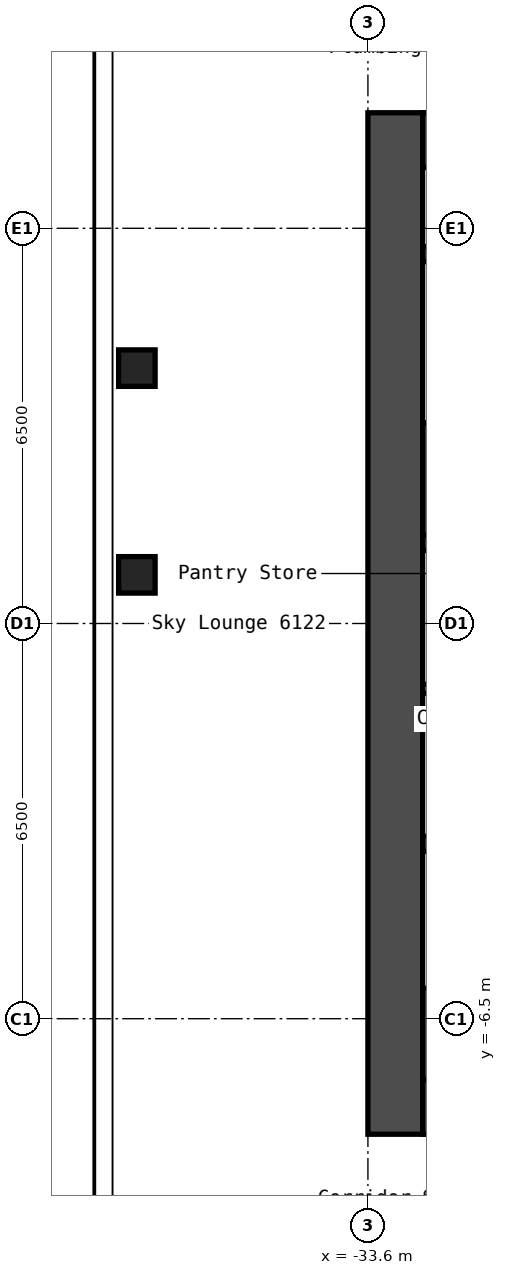
"""IFC4 building model, lengths in metres.
Left out: names, types, materials, properties, quantities, classifications, styles, units other than length and angle.
Written with IfcOpenShell. Run it as: python <this file> out.ifc"""

import sys

from ifc_helpers import new_model, si_unit, direction, frame, frame_2d, origin, origin_2d, place, context, subcontext, project, spatial, rectangle, hollow_rectangle, extrude, element, save


model = new_model("IFC4")
c1 = context("Model", 3, precision=1e-05, world=origin(), true_north=direction((0.0, 1.0)))
c2 = subcontext(c1, "Body", "Model", "MODEL_VIEW")
j1 = project(units=[si_unit("LENGTHUNIT", "METRE"), si_unit("PLANEANGLEUNIT", "RADIAN")], contexts=[c1])
p1 = place(None, origin())
s1 = spatial("IfcSite", under=j1, at=p1, CompositionType="ELEMENT")
p2 = place(p1, origin())
s2 = spatial("IfcBuilding", under=s1, at=p2, CompositionType="ELEMENT")
p3 = place(p2, frame((0.0, 0.0, 215.4)))
s3 = spatial("IfcBuildingStorey", under=s2, at=p3, CompositionType="ELEMENT", Elevation=215.4)
for number, where, z_axis, x_axis in (
    (1, (-37.4, 0.8, 0.0), (0.0, 0.0, 1.0), (1.0, 0.0, 0.0)),
    (2, (-37.4, 4.2, 0.0), (0.0, 0.0, 1.0), (1.0, 0.0, 0.0)),
):
    element("IfcColumn", number, at=place(p3, frame(where, z_axis=z_axis, x_axis=x_axis)), inside=s3, PredefinedType="COLUMN", context=c2, shape_type="SweptSolid", body=[
        extrude(hollow_rectangle(XDim=0.6, YDim=0.6, WallThickness=0.025, InnerFilletRadius=0.038, OuterFilletRadius=0.062, at=origin_2d()), origin(), (0.0, 0.0, 1.0), 2.75),
    ])
p4 = place(p3, frame((-33.15, -8.4, 0.0), z_axis=(0.0, 0.0, 1.0), x_axis=(0.0, 1.0, 0.0)))
e3 = element("IfcWall", 3, at=p4, inside=s3, PredefinedType="SHEAR", context=c2, shape_type="SweptSolid", body=[
    extrude(rectangle(XDim=16.8, YDim=0.9, at=frame_2d((8.4, 0.0))), origin(), (0.0, 0.0, 1.0), 2.75),
])
p5 = place(p3, frame((-32.7, 7.95, 0.0), z_axis=(0.0, 0.0, 1.0), x_axis=(1.0, 0.0, 0.0)))
e4 = element("IfcWall", 4, at=p5, inside=s3, PredefinedType="SHEAR", context=c2, shape_type="SweptSolid", body=[
    extrude(rectangle(XDim=15.0, YDim=0.9, at=frame_2d((7.5, 0.0))), origin(), (0.0, 0.0, 1.0), 2.75),
])
p6 = place(p5, frame((3.4, 0.0, 0.0)))
e5 = element("IfcOpeningElement", 5, at=p6, cuts=e4, PredefinedType="OPENING", context=c2, shape_type="SweptSolid", body=[
    extrude(rectangle(XDim=1.2, YDim=2.1, at=frame_2d((0.6, 1.05))), frame((0.0, 0.46, 0.0), z_axis=(0.0, -1.0, 0.0), x_axis=(1.0, 0.0, 0.0)), (0.0, 0.0, 1.0), 0.92),
])
p7 = place(p5, frame((0.75, 0.0, 0.0)))
e6 = element("IfcOpeningElement", 6, at=p7, cuts=e4, PredefinedType="OPENING", context=c2, shape_type="SweptSolid", body=[
    extrude(rectangle(XDim=0.9, YDim=2.1, at=frame_2d((0.45, 1.05))), frame((0.0, 0.46, 0.0), z_axis=(0.0, -1.0, 0.0), x_axis=(1.0, 0.0, 0.0)), (0.0, 0.0, 1.0), 0.92),
])
p8 = place(p3, frame((-32.7, -7.95, 0.0), z_axis=(0.0, 0.0, 1.0), x_axis=(1.0, 0.0, 0.0)))
e7 = element("IfcWall", 7, at=p8, inside=s3, PredefinedType="SHEAR", context=c2, shape_type="SweptSolid", body=[
    extrude(rectangle(XDim=15.0, YDim=0.9, at=frame_2d((7.5, 0.0))), origin(), (0.0, 0.0, 1.0), 2.75),
])
p9 = place(p8, frame((11.45, 0.0, 0.0)))
e8 = element("IfcOpeningElement", 8, at=p9, cuts=e7, PredefinedType="OPENING", context=c2, shape_type="SweptSolid", body=[
    extrude(rectangle(XDim=1.0, YDim=2.1, at=frame_2d((0.5, 1.05))), frame((0.0, 0.46, 0.0), z_axis=(0.0, -1.0, 0.0), x_axis=(1.0, 0.0, 0.0)), (0.0, 0.0, 1.0), 0.92),
])
p10 = place(p3, frame((-32.7, 1.325, 0.0), z_axis=(0.0, 0.0, 1.0), x_axis=(1.0, 0.0, 0.0)))
e9 = element("IfcWall", 9, at=p10, inside=s3, PredefinedType="SHEAR", context=c2, shape_type="SweptSolid", body=[
    extrude(rectangle(XDim=5.05, YDim=0.25, at=frame_2d((2.525, 0.0))), origin(), (0.0, 0.0, 1.0), 2.75),
])
p11 = place(p10, frame((3.3, 0.0, 0.0)))
e10 = element("IfcOpeningElement", 10, at=p11, cuts=e9, PredefinedType="OPENING", context=c2, shape_type="SweptSolid", body=[
    extrude(rectangle(XDim=1.2, YDim=2.1, at=frame_2d((0.6, 1.05))), frame((0.0, 0.135, 0.0), z_axis=(0.0, -1.0, 0.0), x_axis=(1.0, 0.0, 0.0)), (0.0, 0.0, 1.0), 0.27),
])
p12 = place(p3, frame((-32.7, 2.375, 0.0), z_axis=(0.0, 0.0, 1.0), x_axis=(1.0, 0.0, 0.0)))
e11 = element("IfcWall", 11, at=p12, inside=s3, PredefinedType="SHEAR", context=c2, shape_type="SweptSolid", body=[
    extrude(rectangle(XDim=2.4, YDim=1.85, at=frame_2d((1.2, 0.0))), origin(), (0.0, 0.0, 1.0), 2.75),
])
p13 = place(p3, frame((-32.7, 6.075, 0.0), z_axis=(0.0, 0.0, 1.0), x_axis=(1.0, 0.0, 0.0)))
e12 = element("IfcWall", 12, at=p13, inside=s3, PredefinedType="SHEAR", context=c2, shape_type="SweptSolid", body=[
    extrude(rectangle(XDim=2.4, YDim=0.25, at=frame_2d((1.2, 0.0))), origin(), (0.0, 0.0, 1.0), 2.75),
])
p14 = place(p3, frame((-32.7, -3.625, 0.0), z_axis=(0.0, 0.0, 1.0), x_axis=(1.0, 0.0, 0.0)))
e13 = element("IfcWall", 13, at=p14, inside=s3, PredefinedType="SHEAR", context=c2, shape_type="SweptSolid", body=[
    extrude(rectangle(XDim=4.55, YDim=0.25, at=frame_2d((2.275, 0.0))), origin(), (0.0, 0.0, 1.0), 2.75),
])
p15 = place(p14, frame((2.85, 0.0, 0.0)))
e14 = element("IfcOpeningElement", 14, at=p15, cuts=e13, PredefinedType="OPENING", context=c2, shape_type="SweptSolid", body=[
    extrude(rectangle(XDim=1.1, YDim=2.1, at=frame_2d((0.55, 1.05))), frame((0.0, 0.135, 0.0), z_axis=(0.0, -1.0, 0.0), x_axis=(1.0, 0.0, 0.0)), (0.0, 0.0, 1.0), 0.27),
])
p16 = place(p14, frame((0.6, 0.0, 0.0)))
e15 = element("IfcOpeningElement", 15, at=p16, cuts=e13, PredefinedType="OPENING", context=c2, shape_type="SweptSolid", body=[
    extrude(rectangle(XDim=1.1, YDim=2.1, at=frame_2d((0.55, 1.05))), frame((0.0, 0.135, 0.0), z_axis=(0.0, -1.0, 0.0), x_axis=(1.0, 0.0, 0.0)), (0.0, 0.0, 1.0), 0.27),
])
p17 = place(p3, frame((-32.7, -6.75, 0.0), z_axis=(0.0, 0.0, 1.0), x_axis=(1.0, 0.0, 0.0)))
e16 = element("IfcWall", 16, at=p17, inside=s3, PredefinedType="SHEAR", context=c2, shape_type="SweptSolid", body=[
    extrude(rectangle(XDim=4.55, YDim=1.5, at=frame_2d((2.275, 0.0))), origin(), (0.0, 0.0, 1.0), 2.75),
])
p18 = place(p3, frame((-32.7, -1.075, 0.0), z_axis=(0.0, 0.0, 1.0), x_axis=(1.0, 0.0, 0.0)))
e17 = element("IfcWall", 17, at=p18, inside=s3, PredefinedType="PARTITIONING", context=c2, shape_type="SweptSolid", body=[
    extrude(rectangle(XDim=3.0, YDim=0.15, at=frame_2d((1.5, 0.0))), origin(), (0.0, 0.0, 1.0), 2.75),
])
save(model, sys.argv[1])
